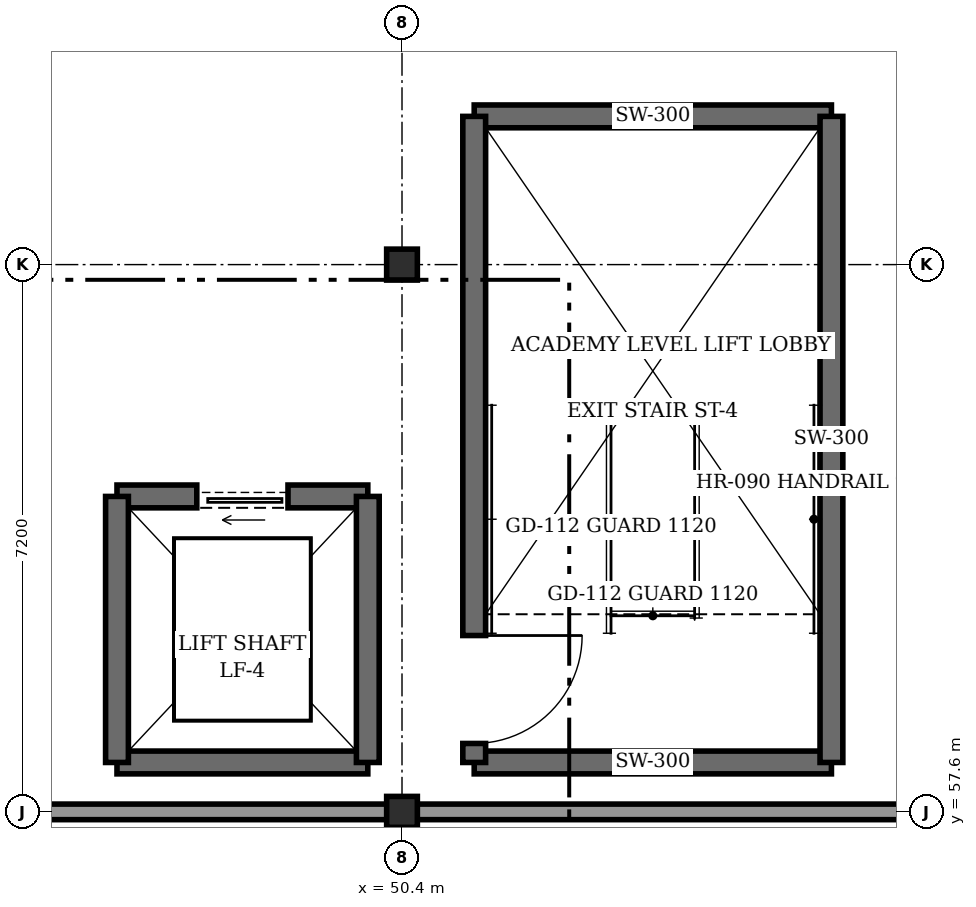
"""IFC4 building model, lengths in metres.
Left out: names, types, materials, properties, quantities, classifications, styles, units other than length and angle.
Written with IfcOpenShell. Run it as: python <this file> out.ifc"""

import sys

from ifc_helpers import new_model, si_unit, direction, frame, frame_2d, origin, origin_2d, place, context, subcontext, project, spatial, rectangle, i_section, extrude, element, fill, save


model = new_model("IFC4")
c1 = context("Model", 3, precision=1e-05, world=origin(), true_north=direction((0.0, 1.0)))
c2 = subcontext(c1, "Body", "Model", "MODEL_VIEW")
j1 = project(units=[si_unit("LENGTHUNIT", "METRE"), si_unit("PLANEANGLEUNIT", "RADIAN")], contexts=[c1])
p1 = place(None, origin())
s1 = spatial("IfcSite", under=j1, at=p1, CompositionType="ELEMENT")
p2 = place(p1, origin())
s2 = spatial("IfcBuilding", under=s1, at=p2, CompositionType="ELEMENT")
p3 = place(p2, frame((0.0, 0.0, 14.4)))
s3 = spatial("IfcBuildingStorey", under=s2, at=p3, CompositionType="ELEMENT", Elevation=14.4)
for number, where, z_axis, x_axis in (
    (1, (50.4, 57.6, 0.0), (0.0, 0.0, 1.0), (1.0, 0.0, 0.0)),
    (2, (50.4, 64.8, 0.0), (0.0, 0.0, 1.0), (1.0, 0.0, 0.0)),
):
    element("IfcColumn", number, at=place(p3, frame(where, z_axis=z_axis, x_axis=x_axis)), inside=s3, PredefinedType="COLUMN", context=c2, shape_type="SweptSolid", body=[
        extrude(i_section(OverallWidth=0.404, OverallDepth=0.407, WebThickness=0.027, FlangeThickness=0.044, at=origin_2d()), origin(), (0.0, 0.0, 1.0), 3.6),
    ])
p4 = place(p3, frame((28.8, 57.6, 0.0), z_axis=(0.0, 0.0, 1.0), x_axis=(1.0, 0.0, 0.0)))
e3 = element("IfcWall", 3, at=p4, inside=s3, PredefinedType="STANDARD", context=c2, shape_type="SweptSolid", body=[
    extrude(rectangle(XDim=28.8, YDim=0.205, at=frame_2d((14.4, 0.0))), origin(), (0.0, 0.0, 1.0), 2.42),
])
for number, where, z_axis, x_axis in (
    (4, (51.35, 58.25, 0.0), (0.0, 0.0, 1.0), (1.0, 0.0, 0.0)),
    (5, (56.05, 66.75, 0.0), (0.0, 0.0, 1.0), (-1.0, 0.0, 0.0)),
):
    element("IfcWall", number, at=place(p3, frame(where, z_axis=z_axis, x_axis=x_axis)), inside=s3, PredefinedType="SHEAR", context=c2, shape_type="SweptSolid", body=[
        extrude(rectangle(XDim=4.7, YDim=0.3, at=frame_2d((2.35, 0.0))), origin(), (0.0, 0.0, 1.0), 3.36),
    ])
p5 = place(p3, frame((51.35, 66.75, 0.0), z_axis=(0.0, 0.0, 1.0), x_axis=(0.0, -1.0, 0.0)))
e6 = element("IfcWall", 6, at=p5, inside=s3, PredefinedType="SHEAR", context=c2, shape_type="SweptSolid", body=[
    extrude(rectangle(XDim=8.5, YDim=0.3, at=frame_2d((4.25, 0.0))), origin(), (0.0, 0.0, 1.0), 3.36),
])
p6 = place(p5, frame((6.83, 0.0, 0.0)))
e7 = element("IfcOpeningElement", 7, at=p6, cuts=e6, PredefinedType="OPENING", context=c2, shape_type="SweptSolid", body=[
    extrude(rectangle(XDim=1.42, YDim=2.22, at=frame_2d((0.71, 1.11))), frame((0.0, 0.16, 0.0), z_axis=(0.0, -1.0, 0.0), x_axis=(1.0, 0.0, 0.0)), (0.0, 0.0, 1.0), 0.32),
])
p7 = place(p3, frame((56.05, 58.25, 0.0), z_axis=(0.0, 0.0, 1.0), x_axis=(0.0, 1.0, 0.0)))
e8 = element("IfcWall", 8, at=p7, inside=s3, PredefinedType="SHEAR", context=c2, shape_type="SweptSolid", body=[
    extrude(rectangle(XDim=8.5, YDim=0.3, at=frame_2d((4.25, 0.0))), origin(), (0.0, 0.0, 1.0), 3.36),
])
p8 = place(p3, frame((46.65, 58.25, 0.0), z_axis=(0.0, 0.0, 1.0), x_axis=(1.0, 0.0, 0.0)))
e9 = element("IfcWall", 9, at=p8, inside=s3, PredefinedType="SHEAR", context=c2, shape_type="SweptSolid", body=[
    extrude(rectangle(XDim=3.3, YDim=0.3, at=frame_2d((1.65, 0.0))), origin(), (0.0, 0.0, 1.0), 3.36),
])
p9 = place(p3, frame((49.95, 61.75, 0.0), z_axis=(0.0, 0.0, 1.0), x_axis=(-1.0, 0.0, 0.0)))
e10 = element("IfcWall", 10, at=p9, inside=s3, PredefinedType="SHEAR", context=c2, shape_type="SweptSolid", body=[
    extrude(rectangle(XDim=3.3, YDim=0.3, at=frame_2d((1.65, 0.0))), origin(), (0.0, 0.0, 1.0), 3.36),
])
p10 = place(p9, frame((1.05, 0.0, 0.0)))
e11 = element("IfcOpeningElement", 11, at=p10, cuts=e10, PredefinedType="OPENING", context=c2, shape_type="SweptSolid", body=[
    extrude(rectangle(XDim=1.2, YDim=2.26, at=frame_2d((0.6, 1.13))), frame((0.0, 0.16, 0.0), z_axis=(0.0, -1.0, 0.0), x_axis=(1.0, 0.0, 0.0)), (0.0, 0.0, 1.0), 0.32),
])
for number, where, z_axis, x_axis in (
    (12, (46.65, 61.75, 0.0), (0.0, 0.0, 1.0), (0.0, -1.0, 0.0)),
    (13, (49.95, 58.25, 0.0), (0.0, 0.0, 1.0), (0.0, 1.0, 0.0)),
):
    element("IfcWall", number, at=place(p3, frame(where, z_axis=z_axis, x_axis=x_axis)), inside=s3, PredefinedType="SHEAR", context=c2, shape_type="SweptSolid", body=[
        extrude(rectangle(XDim=3.5, YDim=0.3, at=frame_2d((1.75, 0.0))), origin(), (0.0, 0.0, 1.0), 3.36),
    ])
p11 = place(p6, origin())
e14 = element("IfcDoor", 14, at=p11, inside=s3, OperationType="SINGLE_SWING_LEFT", PredefinedType="DOOR", context=c2, shape_type="SweptSolid", body=[
    extrude(rectangle(XDim=1.42, YDim=2.22, at=frame_2d((0.71, 1.11))), frame((0.0, 0.025, 0.0), z_axis=(0.0, -1.0, 0.0), x_axis=(1.0, 0.0, 0.0)), (0.0, 0.0, 1.0), 0.05),
])
fill(e7, e14)
p12 = place(p10, origin())
e15 = element("IfcDoor", 15, at=p12, inside=s3, OperationType="SLIDING_TO_LEFT", PredefinedType="DOOR", context=c2, shape_type="SweptSolid", body=[
    extrude(rectangle(XDim=1.2, YDim=2.26, at=frame_2d((0.6, 1.13))), frame((0.0, 0.025, 0.0), z_axis=(0.0, -1.0, 0.0), x_axis=(1.0, 0.0, 0.0)), (0.0, 0.0, 1.0), 0.05),
])
fill(e11, e15)
save(model, sys.argv[1])
